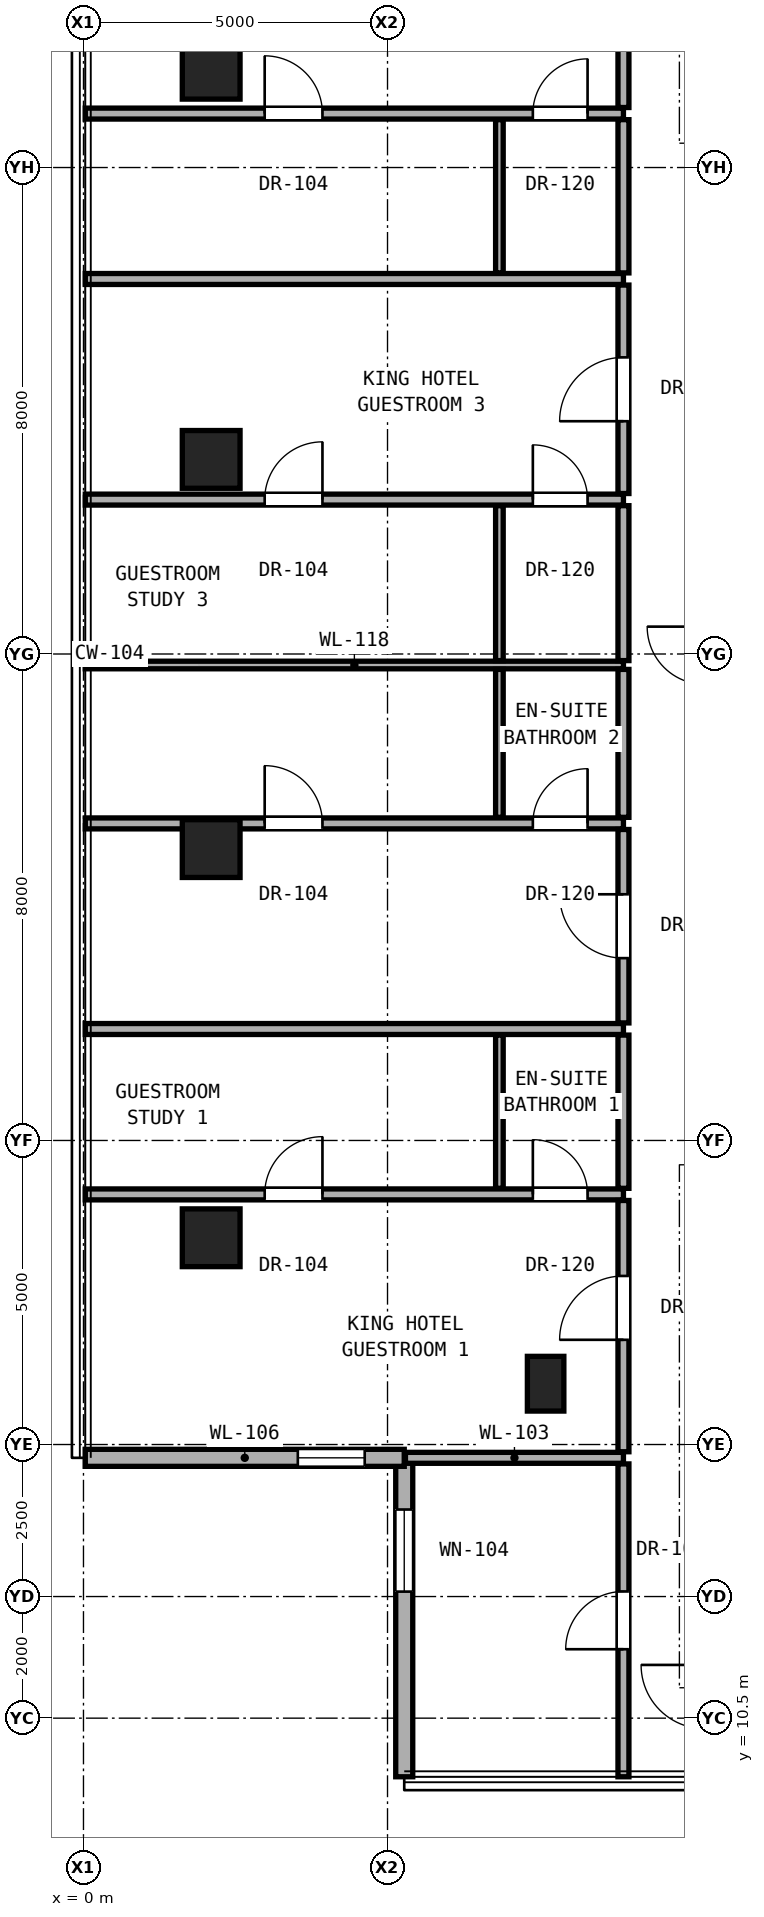
"""IFC4 building model, lengths in metres.
Left out: names, types, materials, properties, quantities, classifications, styles, units other than length and angle.
Written with IfcOpenShell. Run it as: python <this file> out.ifc"""

import sys

from ifc_helpers import new_model, si_unit, direction, frame, frame_2d, origin, origin_2d, place, context, subcontext, project, spatial, rectangle, hollow_rectangle, extrude, element, fill, save


model = new_model("IFC4")
c1 = context("Model", 3, precision=1e-05, world=origin(), true_north=direction((0.0, 1.0)))
c2 = subcontext(c1, "Body", "Model", "MODEL_VIEW")
j1 = project(units=[si_unit("LENGTHUNIT", "METRE"), si_unit("PLANEANGLEUNIT", "RADIAN")], contexts=[c1])
p1 = place(None, origin())
s1 = spatial("IfcSite", under=j1, at=p1, CompositionType="ELEMENT")
p2 = place(p1, origin())
s2 = spatial("IfcBuilding", under=s1, at=p2, CompositionType="ELEMENT")
p3 = place(p2, frame((0.0, 0.0, 164.15)))
s3 = spatial("IfcBuildingStorey", under=s2, at=p3, CompositionType="ELEMENT", Elevation=164.15)
for number, where, z_axis, x_axis in (
    (1, (2.1, 18.4, 0.0), (0.0, 0.0, 1.0), (1.0, 0.0, 0.0)),
    (2, (2.1, 24.8, 0.0), (0.0, 0.0, 1.0), (1.0, 0.0, 0.0)),
    (3, (2.1, 31.2, 0.0), (0.0, 0.0, 1.0), (1.0, 0.0, 0.0)),
    (4, (2.1, 37.6, 0.0), (0.0, 0.0, 1.0), (1.0, 0.0, 0.0)),
):
    element("IfcColumn", number, at=place(p3, frame(where, z_axis=z_axis, x_axis=x_axis)), inside=s3, PredefinedType="COLUMN", context=c2, shape_type="SweptSolid", body=[
        extrude(hollow_rectangle(XDim=0.95, YDim=0.95, WallThickness=0.05, at=origin_2d()), origin(), (0.0, 0.0, 1.0), 3.25),
    ])
p4 = place(p3, frame((7.6, 16.0, 0.0), z_axis=(0.0, 0.0, 1.0), x_axis=(1.0, 0.0, 0.0)))
e5 = element("IfcColumn", 5, at=p4, inside=s3, PredefinedType="PILASTER", context=c2, shape_type="SweptSolid", body=[
    extrude(rectangle(XDim=0.6, YDim=0.9, at=origin_2d()), origin(), (0.0, 0.0, 1.0), 3.25),
])
p5 = place(p3, frame((5.275, 14.781, 0.0), z_axis=(0.0, 0.0, 1.0), x_axis=(0.0, -1.0, 0.0)))
e6 = element("IfcWall", 6, at=p5, inside=s3, PredefinedType="SOLIDWALL", context=c2, shape_type="SweptSolid", body=[
    extrude(rectangle(XDim=5.245, YDim=0.28, at=frame_2d((2.623, 0.0))), origin(), (0.0, 0.0, 1.0), 3.03),
])
p6 = place(p5, frame((0.85, 0.0, 0.68)))
e7 = element("IfcOpeningElement", 7, at=p6, cuts=e6, PredefinedType="OPENING", context=c2, shape_type="SweptSolid", body=[
    extrude(rectangle(XDim=1.35, YDim=2.2, at=frame_2d((0.675, 1.1))), frame((0.0, 0.15, 0.0), z_axis=(0.0, -1.0, 0.0), x_axis=(1.0, 0.0, 0.0)), (0.0, 0.0, 1.0), 0.3),
])
p7 = place(p3, frame((0.03, 14.781, 0.0), z_axis=(0.0, 0.0, 1.0), x_axis=(1.0, 0.0, 0.0)))
e8 = element("IfcWall", 8, at=p7, inside=s3, PredefinedType="SOLIDWALL", context=c2, shape_type="SweptSolid", body=[
    extrude(rectangle(XDim=5.245, YDim=0.28, at=frame_2d((2.623, 0.0))), origin(), (0.0, 0.0, 1.0), 3.03),
])
p8 = place(p7, frame((3.495, 0.0, 0.85)))
e9 = element("IfcOpeningElement", 9, at=p8, cuts=e8, PredefinedType="OPENING", context=c2, shape_type="SweptSolid", body=[
    extrude(rectangle(XDim=1.1, YDim=2.0, at=frame_2d((0.55, 1.0))), frame((0.0, 0.15, 0.0), z_axis=(0.0, -1.0, 0.0), x_axis=(1.0, 0.0, 0.0)), (0.0, 0.0, 1.0), 0.3),
])
p9 = place(p3, frame((5.295, 14.781, 0.0), z_axis=(0.0, 0.0, 1.0), x_axis=(1.0, 0.0, 0.0)))
e10 = element("IfcWall", 10, at=p9, inside=s3, PredefinedType="PARTITIONING", context=c2, shape_type="SweptSolid", body=[
    extrude(rectangle(XDim=3.585, YDim=0.18, at=frame_2d((1.792, 0.0))), origin(), (0.0, 0.0, 1.0), 3.05),
])
p10 = place(p3, frame((0.03, 19.113, 0.0), z_axis=(0.0, 0.0, 1.0), x_axis=(1.0, 0.0, 0.0)))
e11 = element("IfcWall", 11, at=p10, inside=s3, PredefinedType="PARTITIONING", context=c2, shape_type="SweptSolid", body=[
    extrude(rectangle(XDim=8.85, YDim=0.18, at=frame_2d((4.425, 0.0))), origin(), (0.0, 0.0, 1.0), 2.269),
])
p11 = place(p10, frame((2.95, 0.0, 0.0)))
e12 = element("IfcOpeningElement", 12, at=p11, cuts=e11, PredefinedType="OPENING", context=c2, shape_type="SweptSolid", body=[
    extrude(rectangle(XDim=0.95, YDim=2.15, at=frame_2d((0.475, 1.075))), frame((0.0, 0.1, 0.0), z_axis=(0.0, -1.0, 0.0), x_axis=(1.0, 0.0, 0.0)), (0.0, 0.0, 1.0), 0.2),
])
p12 = place(p10, frame((7.36, 0.0, 0.0)))
e13 = element("IfcOpeningElement", 13, at=p12, cuts=e11, PredefinedType="OPENING", context=c2, shape_type="SweptSolid", body=[
    extrude(rectangle(XDim=0.9, YDim=2.1, at=frame_2d((0.45, 1.05))), frame((0.0, 0.1, 0.0), z_axis=(0.0, -1.0, 0.0), x_axis=(1.0, 0.0, 0.0)), (0.0, 0.0, 1.0), 0.2),
])
p13 = place(p3, frame((0.03, 21.833, 0.0), z_axis=(0.0, 0.0, 1.0), x_axis=(1.0, 0.0, 0.0)))
e14 = element("IfcWall", 14, at=p13, inside=s3, PredefinedType="PARTITIONING", context=c2, shape_type="SweptSolid", body=[
    extrude(rectangle(XDim=8.85, YDim=0.18, at=frame_2d((4.425, 0.0))), origin(), (0.0, 0.0, 1.0), 2.269),
])
p14 = place(p3, frame((0.03, 25.214, 0.0), z_axis=(0.0, 0.0, 1.0), x_axis=(1.0, 0.0, 0.0)))
e15 = element("IfcWall", 15, at=p14, inside=s3, PredefinedType="PARTITIONING", context=c2, shape_type="SweptSolid", body=[
    extrude(rectangle(XDim=8.85, YDim=0.18, at=frame_2d((4.425, 0.0))), origin(), (0.0, 0.0, 1.0), 2.269),
])
p15 = place(p14, frame((2.95, 0.0, 0.0)))
e16 = element("IfcOpeningElement", 16, at=p15, cuts=e15, PredefinedType="OPENING", context=c2, shape_type="SweptSolid", body=[
    extrude(rectangle(XDim=0.95, YDim=2.15, at=frame_2d((0.475, 1.075))), frame((0.0, 0.1, 0.0), z_axis=(0.0, -1.0, 0.0), x_axis=(1.0, 0.0, 0.0)), (0.0, 0.0, 1.0), 0.2),
])
p16 = place(p14, frame((7.36, 0.0, 0.0)))
e17 = element("IfcOpeningElement", 17, at=p16, cuts=e15, PredefinedType="OPENING", context=c2, shape_type="SweptSolid", body=[
    extrude(rectangle(XDim=0.9, YDim=2.1, at=frame_2d((0.45, 1.05))), frame((0.0, 0.1, 0.0), z_axis=(0.0, -1.0, 0.0), x_axis=(1.0, 0.0, 0.0)), (0.0, 0.0, 1.0), 0.2),
])
p17 = place(p3, frame((0.03, 27.819, 0.0), z_axis=(0.0, 0.0, 1.0), x_axis=(1.0, 0.0, 0.0)))
e18 = element("IfcWall", 18, at=p17, inside=s3, PredefinedType="PARTITIONING", context=c2, shape_type="SweptSolid", body=[
    extrude(rectangle(XDim=8.85, YDim=0.125, at=frame_2d((4.425, 0.0))), origin(), (0.0, 0.0, 1.0), 2.269),
])
p18 = place(p3, frame((0.03, 30.539, 0.0), z_axis=(0.0, 0.0, 1.0), x_axis=(1.0, 0.0, 0.0)))
e19 = element("IfcWall", 19, at=p18, inside=s3, PredefinedType="PARTITIONING", context=c2, shape_type="SweptSolid", body=[
    extrude(rectangle(XDim=8.85, YDim=0.18, at=frame_2d((4.425, 0.0))), origin(), (0.0, 0.0, 1.0), 2.269),
])
p19 = place(p18, frame((2.95, 0.0, 0.0)))
e20 = element("IfcOpeningElement", 20, at=p19, cuts=e19, PredefinedType="OPENING", context=c2, shape_type="SweptSolid", body=[
    extrude(rectangle(XDim=0.95, YDim=2.15, at=frame_2d((0.475, 1.075))), frame((0.0, 0.1, 0.0), z_axis=(0.0, -1.0, 0.0), x_axis=(1.0, 0.0, 0.0)), (0.0, 0.0, 1.0), 0.2),
])
p20 = place(p18, frame((7.36, 0.0, 0.0)))
e21 = element("IfcOpeningElement", 21, at=p20, cuts=e19, PredefinedType="OPENING", context=c2, shape_type="SweptSolid", body=[
    extrude(rectangle(XDim=0.9, YDim=2.1, at=frame_2d((0.45, 1.05))), frame((0.0, 0.1, 0.0), z_axis=(0.0, -1.0, 0.0), x_axis=(1.0, 0.0, 0.0)), (0.0, 0.0, 1.0), 0.2),
])
p21 = place(p3, frame((0.03, 34.167, 0.0), z_axis=(0.0, 0.0, 1.0), x_axis=(1.0, 0.0, 0.0)))
e22 = element("IfcWall", 22, at=p21, inside=s3, PredefinedType="PARTITIONING", context=c2, shape_type="SweptSolid", body=[
    extrude(rectangle(XDim=8.85, YDim=0.18, at=frame_2d((4.425, 0.0))), origin(), (0.0, 0.0, 1.0), 2.269),
])
p22 = place(p3, frame((0.03, 36.887, 0.0), z_axis=(0.0, 0.0, 1.0), x_axis=(1.0, 0.0, 0.0)))
e23 = element("IfcWall", 23, at=p22, inside=s3, PredefinedType="PARTITIONING", context=c2, shape_type="SweptSolid", body=[
    extrude(rectangle(XDim=8.85, YDim=0.18, at=frame_2d((4.425, 0.0))), origin(), (0.0, 0.0, 1.0), 2.269),
])
p23 = place(p22, frame((2.95, 0.0, 0.0)))
e24 = element("IfcOpeningElement", 24, at=p23, cuts=e23, PredefinedType="OPENING", context=c2, shape_type="SweptSolid", body=[
    extrude(rectangle(XDim=0.95, YDim=2.15, at=frame_2d((0.475, 1.075))), frame((0.0, 0.1, 0.0), z_axis=(0.0, -1.0, 0.0), x_axis=(1.0, 0.0, 0.0)), (0.0, 0.0, 1.0), 0.2),
])
p24 = place(p22, frame((7.36, 0.0, 0.0)))
e25 = element("IfcOpeningElement", 25, at=p24, cuts=e23, PredefinedType="OPENING", context=c2, shape_type="SweptSolid", body=[
    extrude(rectangle(XDim=0.9, YDim=2.1, at=frame_2d((0.45, 1.05))), frame((0.0, 0.1, 0.0), z_axis=(0.0, -1.0, 0.0), x_axis=(1.0, 0.0, 0.0)), (0.0, 0.0, 1.0), 0.2),
])
p25 = place(p3, frame((6.84, 19.213, 0.0), z_axis=(0.0, 0.0, 1.0), x_axis=(0.0, 1.0, 0.0)))
e26 = element("IfcWall", 26, at=p25, inside=s3, PredefinedType="PARTITIONING", context=c2, shape_type="SweptSolid", body=[
    extrude(rectangle(XDim=2.52, YDim=0.125, at=frame_2d((1.26, 0.0))), origin(), (0.0, 0.0, 1.0), 3.05),
])
p26 = place(p3, frame((6.84, 25.314, 0.0), z_axis=(0.0, 0.0, 1.0), x_axis=(0.0, 1.0, 0.0)))
e27 = element("IfcWall", 27, at=p26, inside=s3, PredefinedType="PARTITIONING", context=c2, shape_type="SweptSolid", body=[
    extrude(rectangle(XDim=2.433, YDim=0.125, at=frame_2d((1.216, 0.0))), origin(), (0.0, 0.0, 1.0), 3.05),
])
p27 = place(p3, frame((6.84, 27.892, 0.0), z_axis=(0.0, 0.0, 1.0), x_axis=(0.0, 1.0, 0.0)))
e28 = element("IfcWall", 28, at=p27, inside=s3, PredefinedType="PARTITIONING", context=c2, shape_type="SweptSolid", body=[
    extrude(rectangle(XDim=2.547, YDim=0.125, at=frame_2d((1.274, 0.0))), origin(), (0.0, 0.0, 1.0), 3.05),
])
p28 = place(p3, frame((6.84, 34.267, 0.0), z_axis=(0.0, 0.0, 1.0), x_axis=(0.0, 1.0, 0.0)))
e29 = element("IfcWall", 29, at=p28, inside=s3, PredefinedType="PARTITIONING", context=c2, shape_type="SweptSolid", body=[
    extrude(rectangle(XDim=2.52, YDim=0.125, at=frame_2d((1.26, 0.0))), origin(), (0.0, 0.0, 1.0), 3.05),
])
p29 = place(p3, frame((8.88, 9.536, 0.0), z_axis=(0.0, 0.0, 1.0), x_axis=(0.0, 1.0, 0.0)))
e30 = element("IfcWall", 30, at=p29, inside=s3, PredefinedType="PARTITIONING", context=c2, shape_type="SweptSolid", body=[
    extrude(rectangle(XDim=5.145, YDim=0.18, at=frame_2d((2.573, 0.0))), origin(), (0.0, 0.0, 1.0), 3.05),
])
p30 = place(p29, frame((2.097, 0.0, 0.0)))
e31 = element("IfcOpeningElement", 31, at=p30, cuts=e30, PredefinedType="OPENING", context=c2, shape_type="SweptSolid", body=[
    extrude(rectangle(XDim=0.95, YDim=2.15, at=frame_2d((0.475, 1.075))), frame((0.0, 0.1, 0.0), z_axis=(0.0, -1.0, 0.0), x_axis=(1.0, 0.0, 0.0)), (0.0, 0.0, 1.0), 0.2),
])
p31 = place(p3, frame((8.88, 14.881, 0.0), z_axis=(0.0, 0.0, 1.0), x_axis=(0.0, 1.0, 0.0)))
e32 = element("IfcWall", 32, at=p31, inside=s3, PredefinedType="PARTITIONING", context=c2, shape_type="SweptSolid", body=[
    extrude(rectangle(XDim=4.132, YDim=0.18, at=frame_2d((2.066, 0.0))), origin(), (0.0, 0.0, 1.0), 2.442),
])
p32 = place(p31, frame((1.841, 0.0, 0.0)))
e33 = element("IfcOpeningElement", 33, at=p32, cuts=e32, PredefinedType="OPENING", context=c2, shape_type="SweptSolid", body=[
    extrude(rectangle(XDim=1.05, YDim=2.2, at=frame_2d((0.525, 1.1))), frame((0.0, 0.1, 0.0), z_axis=(0.0, -1.0, 0.0), x_axis=(1.0, 0.0, 0.0)), (0.0, 0.0, 1.0), 0.2),
])
p33 = place(p3, frame((8.88, 19.213, 0.0), z_axis=(0.0, 0.0, 1.0), x_axis=(0.0, 1.0, 0.0)))
e34 = element("IfcWall", 34, at=p33, inside=s3, PredefinedType="PARTITIONING", context=c2, shape_type="SweptSolid", body=[
    extrude(rectangle(XDim=2.52, YDim=0.18, at=frame_2d((1.26, 0.0))), origin(), (0.0, 0.0, 1.0), 3.05),
])
p34 = place(p3, frame((8.88, 21.933, 0.0), z_axis=(0.0, 0.0, 1.0), x_axis=(0.0, 1.0, 0.0)))
e35 = element("IfcWall", 35, at=p34, inside=s3, PredefinedType="PARTITIONING", context=c2, shape_type="SweptSolid", body=[
    extrude(rectangle(XDim=3.181, YDim=0.18, at=frame_2d((1.59, 0.0))), origin(), (0.0, 0.0, 1.0), 2.346),
])
p35 = place(p34, frame((1.065, 0.0, 0.0)))
e36 = element("IfcOpeningElement", 36, at=p35, cuts=e35, PredefinedType="OPENING", context=c2, shape_type="SweptSolid", body=[
    extrude(rectangle(XDim=1.05, YDim=2.2, at=frame_2d((0.525, 1.1))), frame((0.0, 0.1, 0.0), z_axis=(0.0, -1.0, 0.0), x_axis=(1.0, 0.0, 0.0)), (0.0, 0.0, 1.0), 0.2),
])
p36 = place(p3, frame((8.88, 25.314, 0.0), z_axis=(0.0, 0.0, 1.0), x_axis=(0.0, 1.0, 0.0)))
e37 = element("IfcWall", 37, at=p36, inside=s3, PredefinedType="PARTITIONING", context=c2, shape_type="SweptSolid", body=[
    extrude(rectangle(XDim=2.433, YDim=0.18, at=frame_2d((1.216, 0.0))), origin(), (0.0, 0.0, 1.0), 3.05),
])
p37 = place(p3, frame((8.88, 27.892, 0.0), z_axis=(0.0, 0.0, 1.0), x_axis=(0.0, 1.0, 0.0)))
e38 = element("IfcWall", 38, at=p37, inside=s3, PredefinedType="PARTITIONING", context=c2, shape_type="SweptSolid", body=[
    extrude(rectangle(XDim=2.547, YDim=0.18, at=frame_2d((1.274, 0.0))), origin(), (0.0, 0.0, 1.0), 3.05),
])
p38 = place(p3, frame((8.88, 30.639, 0.0), z_axis=(0.0, 0.0, 1.0), x_axis=(0.0, 1.0, 0.0)))
e39 = element("IfcWall", 39, at=p38, inside=s3, PredefinedType="PARTITIONING", context=c2, shape_type="SweptSolid", body=[
    extrude(rectangle(XDim=3.428, YDim=0.18, at=frame_2d((1.714, 0.0))), origin(), (0.0, 0.0, 1.0), 2.346),
])
p39 = place(p38, frame((1.189, 0.0, 0.0)))
e40 = element("IfcOpeningElement", 40, at=p39, cuts=e39, PredefinedType="OPENING", context=c2, shape_type="SweptSolid", body=[
    extrude(rectangle(XDim=1.05, YDim=2.2, at=frame_2d((0.525, 1.1))), frame((0.0, 0.1, 0.0), z_axis=(0.0, -1.0, 0.0), x_axis=(1.0, 0.0, 0.0)), (0.0, 0.0, 1.0), 0.2),
])
p40 = place(p3, frame((8.88, 34.267, 0.0), z_axis=(0.0, 0.0, 1.0), x_axis=(0.0, 1.0, 0.0)))
e41 = element("IfcWall", 41, at=p40, inside=s3, PredefinedType="PARTITIONING", context=c2, shape_type="SweptSolid", body=[
    extrude(rectangle(XDim=2.52, YDim=0.18, at=frame_2d((1.26, 0.0))), origin(), (0.0, 0.0, 1.0), 3.05),
])
p41 = place(p3, frame((8.88, 36.987, 0.0), z_axis=(0.0, 0.0, 1.0), x_axis=(0.0, 1.0, 0.0)))
e42 = element("IfcWall", 42, at=p41, inside=s3, PredefinedType="PARTITIONING", context=c2, shape_type="SweptSolid", body=[
    extrude(rectangle(XDim=4.132, YDim=0.18, at=frame_2d((2.066, 0.0))), origin(), (0.0, 0.0, 1.0), 2.442),
])
p42 = place(p41, frame((1.241, 0.0, 0.0)))
e43 = element("IfcOpeningElement", 43, at=p42, cuts=e42, PredefinedType="OPENING", context=c2, shape_type="SweptSolid", body=[
    extrude(rectangle(XDim=1.05, YDim=2.2, at=frame_2d((0.525, 1.1))), frame((0.0, 0.1, 0.0), z_axis=(0.0, -1.0, 0.0), x_axis=(1.0, 0.0, 0.0)), (0.0, 0.0, 1.0), 0.2),
])
p43 = place(p6, origin())
e44 = element("IfcWindow", 44, at=p43, inside=s3, PartitioningType="SINGLE_PANEL", PredefinedType="WINDOW", context=c2, shape_type="SweptSolid", body=[
    extrude(rectangle(XDim=1.35, YDim=2.2, at=frame_2d((0.675, 1.1))), frame((0.0, 0.03, 0.0), z_axis=(0.0, -1.0, 0.0), x_axis=(1.0, 0.0, 0.0)), (0.0, 0.0, 1.0), 0.06),
])
fill(e7, e44)
p44 = place(p8, origin())
e45 = element("IfcWindow", 45, at=p44, inside=s3, PartitioningType="SINGLE_PANEL", PredefinedType="WINDOW", context=c2, shape_type="SweptSolid", body=[
    extrude(rectangle(XDim=1.1, YDim=2.0, at=frame_2d((0.55, 1.0))), frame((0.0, 0.03, 0.0), z_axis=(0.0, -1.0, 0.0), x_axis=(1.0, 0.0, 0.0)), (0.0, 0.0, 1.0), 0.06),
])
fill(e9, e45)
p45 = place(p32, origin())
e46 = element("IfcDoor", 46, at=p45, inside=s3, OperationType="SINGLE_SWING_LEFT", PredefinedType="DOOR", context=c2, shape_type="SweptSolid", body=[
    extrude(rectangle(XDim=1.05, YDim=2.2, at=frame_2d((0.525, 1.1))), frame((0.0, 0.025, 0.0), z_axis=(0.0, -1.0, 0.0), x_axis=(1.0, 0.0, 0.0)), (0.0, 0.0, 1.0), 0.05),
])
fill(e33, e46)
p46 = place(p11, origin())
e47 = element("IfcDoor", 47, at=p46, inside=s3, OperationType="SINGLE_SWING_RIGHT", PredefinedType="DOOR", context=c2, shape_type="SweptSolid", body=[
    extrude(rectangle(XDim=0.95, YDim=2.15, at=frame_2d((0.475, 1.075))), frame((0.0, 0.025, 0.0), z_axis=(0.0, -1.0, 0.0), x_axis=(1.0, 0.0, 0.0)), (0.0, 0.0, 1.0), 0.05),
])
fill(e12, e47)
p47 = place(p12, origin())
e48 = element("IfcDoor", 48, at=p47, inside=s3, OperationType="SINGLE_SWING_LEFT", PredefinedType="DOOR", context=c2, shape_type="SweptSolid", body=[
    extrude(rectangle(XDim=0.9, YDim=2.1, at=frame_2d((0.45, 1.05))), frame((0.0, 0.025, 0.0), z_axis=(0.0, -1.0, 0.0), x_axis=(1.0, 0.0, 0.0)), (0.0, 0.0, 1.0), 0.05),
])
fill(e13, e48)
p48 = place(p35, origin())
e49 = element("IfcDoor", 49, at=p48, inside=s3, OperationType="SINGLE_SWING_RIGHT", PredefinedType="DOOR", context=c2, shape_type="SweptSolid", body=[
    extrude(rectangle(XDim=1.05, YDim=2.2, at=frame_2d((0.525, 1.1))), frame((0.0, 0.025, 0.0), z_axis=(0.0, -1.0, 0.0), x_axis=(1.0, 0.0, 0.0)), (0.0, 0.0, 1.0), 0.05),
])
fill(e36, e49)
p49 = place(p15, origin())
e50 = element("IfcDoor", 50, at=p49, inside=s3, OperationType="SINGLE_SWING_LEFT", PredefinedType="DOOR", context=c2, shape_type="SweptSolid", body=[
    extrude(rectangle(XDim=0.95, YDim=2.15, at=frame_2d((0.475, 1.075))), frame((0.0, 0.025, 0.0), z_axis=(0.0, -1.0, 0.0), x_axis=(1.0, 0.0, 0.0)), (0.0, 0.0, 1.0), 0.05),
])
fill(e16, e50)
p50 = place(p16, origin())
e51 = element("IfcDoor", 51, at=p50, inside=s3, OperationType="SINGLE_SWING_RIGHT", PredefinedType="DOOR", context=c2, shape_type="SweptSolid", body=[
    extrude(rectangle(XDim=0.9, YDim=2.1, at=frame_2d((0.45, 1.05))), frame((0.0, 0.025, 0.0), z_axis=(0.0, -1.0, 0.0), x_axis=(1.0, 0.0, 0.0)), (0.0, 0.0, 1.0), 0.05),
])
fill(e17, e51)
p51 = place(p39, origin())
e52 = element("IfcDoor", 52, at=p51, inside=s3, OperationType="SINGLE_SWING_LEFT", PredefinedType="DOOR", context=c2, shape_type="SweptSolid", body=[
    extrude(rectangle(XDim=1.05, YDim=2.2, at=frame_2d((0.525, 1.1))), frame((0.0, 0.025, 0.0), z_axis=(0.0, -1.0, 0.0), x_axis=(1.0, 0.0, 0.0)), (0.0, 0.0, 1.0), 0.05),
])
fill(e40, e52)
p52 = place(p19, origin())
e53 = element("IfcDoor", 53, at=p52, inside=s3, OperationType="SINGLE_SWING_RIGHT", PredefinedType="DOOR", context=c2, shape_type="SweptSolid", body=[
    extrude(rectangle(XDim=0.95, YDim=2.15, at=frame_2d((0.475, 1.075))), frame((0.0, 0.025, 0.0), z_axis=(0.0, -1.0, 0.0), x_axis=(1.0, 0.0, 0.0)), (0.0, 0.0, 1.0), 0.05),
])
fill(e20, e53)
p53 = place(p20, origin())
e54 = element("IfcDoor", 54, at=p53, inside=s3, OperationType="SINGLE_SWING_LEFT", PredefinedType="DOOR", context=c2, shape_type="SweptSolid", body=[
    extrude(rectangle(XDim=0.9, YDim=2.1, at=frame_2d((0.45, 1.05))), frame((0.0, 0.025, 0.0), z_axis=(0.0, -1.0, 0.0), x_axis=(1.0, 0.0, 0.0)), (0.0, 0.0, 1.0), 0.05),
])
fill(e21, e54)
p54 = place(p23, origin())
e55 = element("IfcDoor", 55, at=p54, inside=s3, OperationType="SINGLE_SWING_LEFT", PredefinedType="DOOR", context=c2, shape_type="SweptSolid", body=[
    extrude(rectangle(XDim=0.95, YDim=2.15, at=frame_2d((0.475, 1.075))), frame((0.0, 0.025, 0.0), z_axis=(0.0, -1.0, 0.0), x_axis=(1.0, 0.0, 0.0)), (0.0, 0.0, 1.0), 0.05),
])
fill(e24, e55)
p55 = place(p24, origin())
e56 = element("IfcDoor", 56, at=p55, inside=s3, OperationType="SINGLE_SWING_RIGHT", PredefinedType="DOOR", context=c2, shape_type="SweptSolid", body=[
    extrude(rectangle(XDim=0.9, YDim=2.1, at=frame_2d((0.45, 1.05))), frame((0.0, 0.025, 0.0), z_axis=(0.0, -1.0, 0.0), x_axis=(1.0, 0.0, 0.0)), (0.0, 0.0, 1.0), 0.05),
])
fill(e25, e56)
p56 = place(p30, origin())
e57 = element("IfcDoor", 57, at=p56, inside=s3, OperationType="SINGLE_SWING_LEFT", PredefinedType="DOOR", context=c2, shape_type="SweptSolid", body=[
    extrude(rectangle(XDim=0.95, YDim=2.15, at=frame_2d((0.475, 1.075))), frame((0.0, 0.025, 0.0), z_axis=(0.0, -1.0, 0.0), x_axis=(1.0, 0.0, 0.0)), (0.0, 0.0, 1.0), 0.05),
])
fill(e31, e57)
save(model, sys.argv[1])
